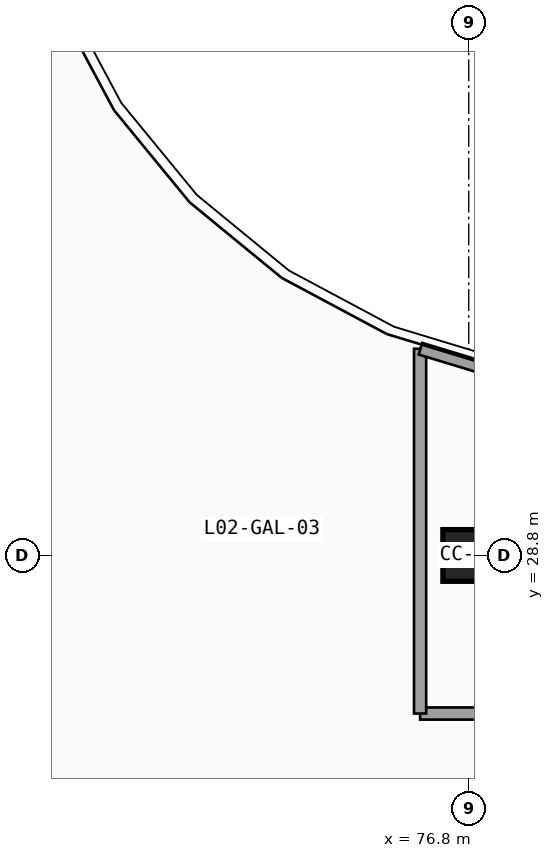
"""IFC4 building model, lengths in metres.
Left out: names, types, materials, properties, quantities, classifications, styles, units other than length and angle.
Written with IfcOpenShell. Run it as: python <this file> out.ifc"""

import sys

from ifc_helpers import new_model, si_unit, direction, frame, frame_2d, origin, origin_2d, place, context, subcontext, project, spatial, rectangle, extrude, element, save


model = new_model("IFC4")
c1 = context("Model", 3, precision=1e-05, world=origin(), true_north=direction((0.0, 1.0)))
c2 = subcontext(c1, "Body", "Model", "MODEL_VIEW")
j1 = project(units=[si_unit("LENGTHUNIT", "METRE"), si_unit("PLANEANGLEUNIT", "RADIAN")], contexts=[c1])
p1 = place(None, origin())
s1 = spatial("IfcSite", under=j1, at=p1, CompositionType="ELEMENT")
p2 = place(p1, origin())
s2 = spatial("IfcBuilding", under=s1, at=p2, CompositionType="ELEMENT")
p3 = place(p2, frame((0.0, 0.0, 9.6)))
s3 = spatial("IfcBuildingStorey", under=s2, at=p3, CompositionType="ELEMENT", Elevation=9.6)
p4 = place(p3, frame((76.8, 28.8, 0.0), z_axis=(0.0, 0.0, 1.0), x_axis=(1.0, 0.0, 0.0)))
e1 = element("IfcColumn", 1, at=p4, inside=s3, PredefinedType="COLUMN", context=c2, shape_type="SweptSolid", body=[
    extrude(rectangle(XDim=0.85, YDim=0.85, at=origin_2d()), origin(), (0.0, 0.0, 1.0), 4.5),
])
p5 = place(p3, frame((78.35, 26.2, 0.0), z_axis=(0.0, 0.0, 1.0), x_axis=(-1.0, 0.0, 0.0)))
e2 = element("IfcWall", 2, at=p5, inside=s3, PredefinedType="PARTITIONING", context=c2, shape_type="SweptSolid", body=[
    extrude(rectangle(XDim=2.35, YDim=0.2, at=frame_2d((1.175, 0.0))), origin(), (0.0, 0.0, 1.0), 3.613),
])
p6 = place(p3, frame((76.0, 26.2, 0.0), z_axis=(0.0, 0.0, 1.0), x_axis=(0.0, 1.0, 0.0)))
e3 = element("IfcWall", 3, at=p6, inside=s3, PredefinedType="PARTITIONING", context=c2, shape_type="SweptSolid", body=[
    extrude(rectangle(XDim=6.0, YDim=0.2, at=frame_2d((3.0, 0.0))), origin(), (0.0, 0.0, 1.0), 3.466),
])
p7 = place(p3, frame((76.006, 32.2, 0.0), z_axis=(0.0, 0.0, 1.0), x_axis=(0.956921766266, -0.290345885534, 0.0)))
e4 = element("IfcWall", 4, at=p7, inside=s3, PredefinedType="PARTITIONING", context=c2, shape_type="SweptSolid", body=[
    extrude(rectangle(XDim=1.441, YDim=0.2, at=frame_2d((0.721, 0.0))), origin(), (0.0, 0.0, 1.0), 4.22),
])
save(model, sys.argv[1])
